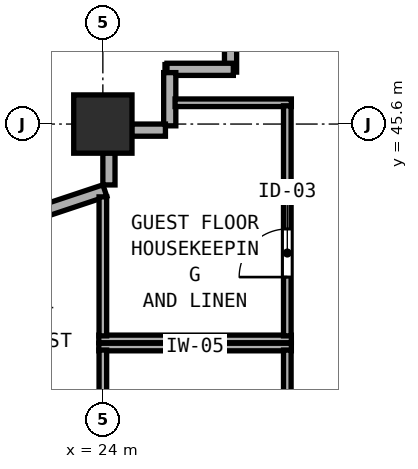
"""IFC4 building model, lengths in metres.
Left out: names, types, materials, properties, quantities, classifications, styles, units other than length and angle.
Written with IfcOpenShell. Run it as: python <this file> out.ifc"""

import sys

from ifc_helpers import new_model, si_unit, direction, frame, frame_2d, origin, origin_2d, place, context, subcontext, project, spatial, rectangle, hollow_rectangle, extrude, element, fill, save


model = new_model("IFC4")
c1 = context("Model", 3, precision=1e-05, world=origin(), true_north=direction((0.0, 1.0)))
c2 = subcontext(c1, "Body", "Model", "MODEL_VIEW")
j1 = project(units=[si_unit("LENGTHUNIT", "METRE"), si_unit("PLANEANGLEUNIT", "RADIAN")], contexts=[c1])
p1 = place(None, origin())
s1 = spatial("IfcSite", under=j1, at=p1, CompositionType="ELEMENT")
p2 = place(p1, origin())
s2 = spatial("IfcBuilding", under=s1, at=p2, CompositionType="ELEMENT")
p3 = place(p2, frame((0.0, 0.0, 78.0)))
s3 = spatial("IfcBuildingStorey", under=s2, at=p3, CompositionType="ELEMENT", Elevation=78.0)
p4 = place(p3, frame((24.0, 45.6, 0.0), z_axis=(0.0, 0.0, 1.0), x_axis=(1.0, 0.0, 0.0)))
e1 = element("IfcColumn", 1, at=p4, inside=s3, PredefinedType="COLUMN", context=c2, shape_type="SweptSolid", body=[
    extrude(hollow_rectangle(XDim=1.15, YDim=1.15, WallThickness=0.042, at=origin_2d()), origin(), (0.0, 0.0, 1.0), 3.8),
])
p5 = place(p3, frame((26.52, 47.995, 0.0), z_axis=(0.0, 0.0, 1.0), x_axis=(0.0, -1.0, 0.0)))
e2 = element("IfcWall", 2, at=p5, inside=s3, PredefinedType="SOLIDWALL", context=c2, shape_type="SweptSolid", body=[
    extrude(rectangle(XDim=1.37, YDim=0.24, at=frame_2d((0.685, 0.0))), origin(), (0.0, 0.0, 1.0), 3.6),
])
p6 = place(p3, frame((26.575, 46.68, 0.0), z_axis=(0.0, 0.0, 1.0), x_axis=(-1.0, 0.0, 0.0)))
e3 = element("IfcWall", 3, at=p6, inside=s3, PredefinedType="SOLIDWALL", context=c2, shape_type="SweptSolid", body=[
    extrude(rectangle(XDim=1.31, YDim=0.24, at=frame_2d((0.655, 0.0))), origin(), (0.0, 0.0, 1.0), 3.6),
])
p7 = place(p3, frame((25.32, 46.615, 0.0), z_axis=(0.0, 0.0, 1.0), x_axis=(0.0, -1.0, 0.0)))
e4 = element("IfcWall", 4, at=p7, inside=s3, PredefinedType="SOLIDWALL", context=c2, shape_type="SweptSolid", body=[
    extrude(rectangle(XDim=1.05, YDim=0.24, at=frame_2d((0.525, 0.0))), origin(), (0.0, 0.0, 1.0), 3.6),
])
p8 = place(p3, frame((25.235, 45.48, 0.0), z_axis=(0.0, 0.0, 1.0), x_axis=(-1.0, 0.0, 0.0)))
e5 = element("IfcWall", 5, at=p8, inside=s3, PredefinedType="SOLIDWALL", context=c2, shape_type="SweptSolid", body=[
    extrude(rectangle(XDim=0.668, YDim=0.24, at=frame_2d((0.334, 0.0))), origin(), (0.0, 0.0, 1.0), 3.6),
])
p9 = place(p3, frame((24.12, 45.033, 0.0), z_axis=(0.0, 0.0, 1.0), x_axis=(0.0, -1.0, 0.0)))
e6 = element("IfcWall", 6, at=p9, inside=s3, PredefinedType="SOLIDWALL", context=c2, shape_type="SweptSolid", body=[
    extrude(rectangle(XDim=0.635, YDim=0.24, at=frame_2d((0.317, 0.0))), origin(), (0.0, 0.0, 1.0), 3.097),
])
p10 = place(p3, frame((24.039, 44.287, 0.0), z_axis=(0.0, 0.0, 1.0), x_axis=(-0.948678995954, -0.316240672014, 0.0)))
e7 = element("IfcWall", 7, at=p10, inside=s3, PredefinedType="SOLIDWALL", context=c2, shape_type="SweptSolid", body=[
    extrude(rectangle(XDim=5.675, YDim=0.24, at=frame_2d((2.837, 0.0))), origin(), (0.0, 0.0, 1.0), 3.097),
])
p11 = place(p10, frame((1.6, 0.0, 0.85)))
e8 = element("IfcOpeningElement", 8, at=p11, cuts=e7, PredefinedType="OPENING", context=c2, shape_type="SweptSolid", body=[
    extrude(rectangle(XDim=1.2, YDim=1.85, at=frame_2d((0.6, 0.925))), frame((0.0, 0.13, 0.0), z_axis=(0.0, -1.0, 0.0), x_axis=(1.0, 0.0, 0.0)), (0.0, 0.0, 1.0), 0.26),
])
p12 = place(p10, frame((4.206, 0.0, 0.85)))
e9 = element("IfcOpeningElement", 9, at=p12, cuts=e7, PredefinedType="OPENING", context=c2, shape_type="SweptSolid", body=[
    extrude(rectangle(XDim=1.1, YDim=1.75, at=frame_2d((0.55, 0.875))), frame((0.0, 0.13, 0.0), z_axis=(0.0, -1.0, 0.0), x_axis=(1.0, 0.0, 0.0)), (0.0, 0.0, 1.0), 0.26),
])
p13 = place(p3, frame((23.92, 41.2, 0.0), z_axis=(0.0, 0.0, 1.0), x_axis=(1.0, 0.0, 0.0)))
e10 = element("IfcWall", 10, at=p13, inside=s3, PredefinedType="PARTITIONING", context=c2, shape_type="SweptSolid", body=[
    extrude(rectangle(XDim=3.8, YDim=0.15, at=frame_2d((1.9, 0.0))), origin(), (0.0, 0.0, 1.0), 3.6),
])
p14 = place(p3, frame((24.0, 33.06, 0.0), z_axis=(0.0, 0.0, 1.0), x_axis=(0.0, 1.0, 0.0)))
e11 = element("IfcWall", 11, at=p14, inside=s3, PredefinedType="PARTITIONING", context=c2, shape_type="SweptSolid", body=[
    extrude(rectangle(XDim=8.08, YDim=0.15, at=frame_2d((4.04, 0.0))), origin(), (0.0, 0.0, 1.0), 3.097),
])
p15 = place(p3, frame((27.64, 33.06, 0.0), z_axis=(0.0, 0.0, 1.0), x_axis=(0.0, 1.0, 0.0)))
e12 = element("IfcWall", 12, at=p15, inside=s3, PredefinedType="PARTITIONING", context=c2, shape_type="SweptSolid", body=[
    extrude(rectangle(XDim=8.08, YDim=0.15, at=frame_2d((4.04, 0.0))), origin(), (0.0, 0.0, 1.0), 3.6),
])
p16 = place(p15, frame((3.61, 0.0, 0.0), z_axis=(0.0, 0.0, 1.0), x_axis=(-1.0, 0.0, 0.0)))
e13 = element("IfcOpeningElement", 13, at=p16, cuts=e12, PredefinedType="OPENING", context=c2, shape_type="SweptSolid", body=[
    extrude(rectangle(XDim=0.95, YDim=2.12, at=frame_2d((0.475, 1.06))), frame((0.0, 0.085, 0.0), z_axis=(0.0, -1.0, 0.0), x_axis=(1.0, 0.0, 0.0)), (0.0, 0.0, 1.0), 0.17),
])
p17 = place(p3, frame((25.425, 46.02, 0.0), z_axis=(0.0, 0.0, 1.0), x_axis=(1.0, 0.0, 0.0)))
e14 = element("IfcWall", 14, at=p17, inside=s3, PredefinedType="PARTITIONING", context=c2, shape_type="SweptSolid", body=[
    extrude(rectangle(XDim=2.295, YDim=0.15, at=frame_2d((1.147, 0.0))), origin(), (0.0, 0.0, 1.0), 3.6),
])
p18 = place(p3, frame((23.92, 41.36, 0.0), z_axis=(0.0, 0.0, 1.0), x_axis=(1.0, 0.0, 0.0)))
e15 = element("IfcWall", 15, at=p18, inside=s3, PredefinedType="PARTITIONING", context=c2, shape_type="SweptSolid", body=[
    extrude(rectangle(XDim=3.8, YDim=0.15, at=frame_2d((1.9, 0.0))), origin(), (0.0, 0.0, 1.0), 3.6),
])
p19 = place(p3, frame((24.0, 41.42, 0.0), z_axis=(0.0, 0.0, 1.0), x_axis=(0.0, 1.0, 0.0)))
e16 = element("IfcWall", 16, at=p19, inside=s3, PredefinedType="PARTITIONING", context=c2, shape_type="SweptSolid", body=[
    extrude(rectangle(XDim=2.743, YDim=0.15, at=frame_2d((1.372, 0.0))), origin(), (0.0, 0.0, 1.0), 3.097),
])
p20 = place(p3, frame((27.64, 41.42, 0.0), z_axis=(0.0, 0.0, 1.0), x_axis=(0.0, 1.0, 0.0)))
e17 = element("IfcWall", 17, at=p20, inside=s3, PredefinedType="PARTITIONING", context=c2, shape_type="SweptSolid", body=[
    extrude(rectangle(XDim=4.54, YDim=0.15, at=frame_2d((2.27, 0.0))), origin(), (0.0, 0.0, 1.0), 3.6),
])
p21 = place(p20, frame((2.11, 0.0, 0.0), z_axis=(0.0, 0.0, 1.0), x_axis=(-1.0, 0.0, 0.0)))
e18 = element("IfcOpeningElement", 18, at=p21, cuts=e17, PredefinedType="OPENING", context=c2, shape_type="SweptSolid", body=[
    extrude(rectangle(XDim=0.95, YDim=2.12, at=frame_2d((0.475, 1.06))), frame((0.0, 0.085, 0.0), z_axis=(0.0, -1.0, 0.0), x_axis=(1.0, 0.0, 0.0)), (0.0, 0.0, 1.0), 0.17),
])
p22 = place(p21, origin())
e19 = element("IfcDoor", 19, at=p22, inside=s3, OperationType="SINGLE_SWING_RIGHT", PredefinedType="DOOR", context=c2, shape_type="SweptSolid", body=[
    extrude(rectangle(XDim=0.95, YDim=2.12, at=frame_2d((0.475, 1.06))), frame((0.0, 0.025, 0.0), z_axis=(0.0, -1.0, 0.0), x_axis=(1.0, 0.0, 0.0)), (0.0, 0.0, 1.0), 0.05),
])
fill(e18, e19)
save(model, sys.argv[1])
